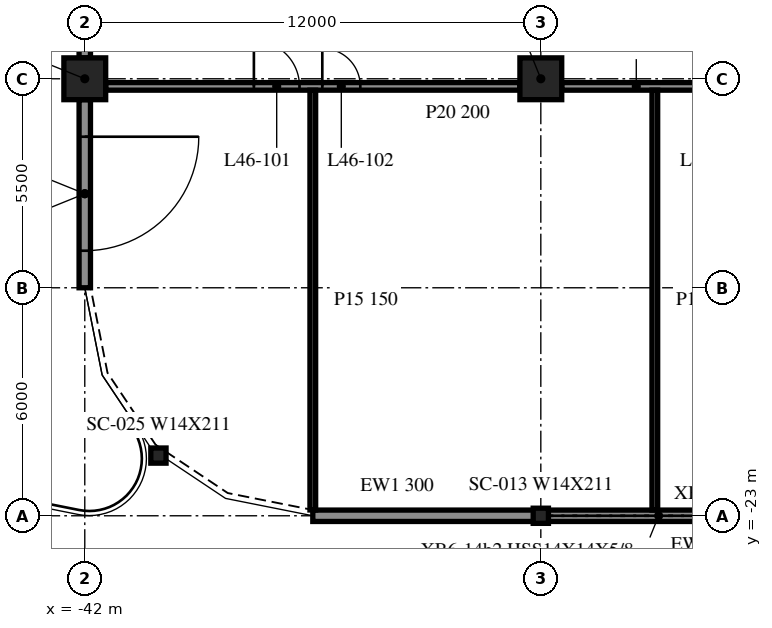
"""IFC4 building model, lengths in metres.
Left out: names, types, materials, properties, quantities, classifications, styles, units other than length and angle.
Written with IfcOpenShell. Run it as: python <this file> out.ifc"""

import sys

from ifc_helpers import new_model, si_unit, direction, frame, frame_2d, origin, origin_2d, place, context, subcontext, project, spatial, rectangle, i_section, extrude, element, fill, save


model = new_model("IFC4")
c1 = context("Model", 3, precision=1e-05, world=origin(), true_north=direction((0.0, 1.0)))
c2 = subcontext(c1, "Body", "Model", "MODEL_VIEW")
j1 = project(units=[si_unit("LENGTHUNIT", "METRE"), si_unit("PLANEANGLEUNIT", "RADIAN")], contexts=[c1])
p1 = place(None, origin())
s1 = spatial("IfcSite", under=j1, at=p1, CompositionType="ELEMENT")
p2 = place(p1, origin())
s2 = spatial("IfcBuilding", under=s1, at=p2, CompositionType="ELEMENT")
p3 = place(p2, frame((0.0, 0.0, 193.9)))
s3 = spatial("IfcBuildingStorey", under=s2, at=p3, CompositionType="ELEMENT", Elevation=193.9)
for number, where, z_axis, x_axis in (
    (1, (-42.0, -11.5, -0.34), (0.0, 0.0, 1.0), (1.0, 0.0, 0.0)),
    (2, (-30.0, -11.5, -0.34), (0.0, 0.0, 1.0), (1.0, 0.0, 0.0)),
):
    element("IfcColumn", number, at=place(p3, frame(where, z_axis=z_axis, x_axis=x_axis)), inside=s3, PredefinedType="COLUMN", context=c2, shape_type="SweptSolid", body=[
        extrude(rectangle(XDim=1.1, YDim=1.1, at=origin_2d()), origin(), (0.0, 0.0, 1.0), 3.8),
    ])
for number, where, z_axis, x_axis in (
    (3, (-40.062, -21.416, -0.34), (0.0, 0.0, 1.0), (1.0, 0.0, 0.0)),
    (4, (-30.0, -23.0, -0.34), (0.0, 0.0, 1.0), (1.0, 0.0, 0.0)),
):
    element("IfcColumn", number, at=place(p3, frame(where, z_axis=z_axis, x_axis=x_axis)), inside=s3, PredefinedType="COLUMN", context=c2, shape_type="SweptSolid", body=[
        extrude(i_section(OverallWidth=0.401, OverallDepth=0.399, WebThickness=0.025, FlangeThickness=0.04, at=origin_2d()), origin(), (0.0, 0.0, 1.0), 3.8),
    ])
p4 = place(p3, frame((-42.0, -0.55, 0.0), z_axis=(0.0, 0.0, 1.0), x_axis=(0.0, -1.0, 0.0)))
e5 = element("IfcWall", 5, at=p4, inside=s3, PredefinedType="NOTDEFINED", context=c2, shape_type="SweptSolid", body=[
    extrude(rectangle(XDim=10.4, YDim=0.3, at=frame_2d((5.2, 0.0))), origin(), (0.0, 0.0, 1.0), 2.782),
])
p5 = place(p4, frame((3.7, 0.0, 0.0)))
e6 = element("IfcOpeningElement", 6, at=p5, cuts=e5, PredefinedType="OPENING", context=c2, shape_type="SweptSolid", body=[
    extrude(rectangle(XDim=3.0, YDim=2.4, at=frame_2d((1.5, 1.2))), frame((0.0, 0.16, 0.0), z_axis=(0.0, -1.0, 0.0), x_axis=(1.0, 0.0, 0.0)), (0.0, 0.0, 1.0), 0.32),
])
p6 = place(p3, frame((-42.0, -12.05, 0.0), z_axis=(0.0, 0.0, 1.0), x_axis=(0.0, -1.0, 0.0)))
e7 = element("IfcWall", 7, at=p6, inside=s3, PredefinedType="NOTDEFINED", context=c2, shape_type="SweptSolid", body=[
    extrude(rectangle(XDim=4.95, YDim=0.3, at=frame_2d((2.475, 0.0))), origin(), (0.0, 0.0, 1.0), 2.782),
])
p7 = place(p6, frame((0.975, 0.0, 0.0)))
e8 = element("IfcOpeningElement", 8, at=p7, cuts=e7, PredefinedType="OPENING", context=c2, shape_type="SweptSolid", body=[
    extrude(rectangle(XDim=3.0, YDim=2.4, at=frame_2d((1.5, 1.2))), frame((0.0, 0.16, 0.0), z_axis=(0.0, -1.0, 0.0), x_axis=(1.0, 0.0, 0.0)), (0.0, 0.0, 1.0), 0.32),
])
p8 = place(p3, frame((-36.0, -23.0, 0.0), z_axis=(0.0, 0.0, 1.0), x_axis=(1.0, 0.0, 0.0)))
e9 = element("IfcWall", 9, at=p8, inside=s3, PredefinedType="NOTDEFINED", context=c2, shape_type="SweptSolid", body=[
    extrude(rectangle(XDim=5.988, YDim=0.3, at=frame_2d((2.994, 0.0))), origin(), (0.0, 0.0, 1.0), 2.782),
])
p9 = place(p3, frame((-29.988, -23.0, 0.0), z_axis=(0.0, 0.0, 1.0), x_axis=(1.0, 0.0, 0.0)))
e10 = element("IfcWall", 10, at=p9, inside=s3, PredefinedType="NOTDEFINED", context=c2, shape_type="SweptSolid", body=[
    extrude(rectangle(XDim=11.975, YDim=0.3, at=frame_2d((5.988, 0.0))), origin(), (0.0, 0.0, 1.0), 2.782),
])
p10 = place(p3, frame((-41.45, -11.7, 0.0), z_axis=(0.0, 0.0, 1.0), x_axis=(1.0, 0.0, 0.0)))
e11 = element("IfcWall", 11, at=p10, inside=s3, PredefinedType="PARTITIONING", context=c2, shape_type="SweptSolid", body=[
    extrude(rectangle(XDim=10.9, YDim=0.2, at=frame_2d((5.45, 0.0))), origin(), (0.0, 0.0, 1.0), 3.46),
])
p11 = place(p10, frame((3.9, 0.0, 0.0)))
e12 = element("IfcOpeningElement", 12, at=p11, cuts=e11, PredefinedType="OPENING", context=c2, shape_type="SweptSolid", body=[
    extrude(rectangle(XDim=1.2, YDim=2.1, at=frame_2d((0.6, 1.05))), frame((0.0, 0.11, 0.0), z_axis=(0.0, -1.0, 0.0), x_axis=(1.0, 0.0, 0.0)), (0.0, 0.0, 1.0), 0.22),
])
p12 = place(p10, frame((5.7, 0.0, 0.0)))
e13 = element("IfcOpeningElement", 13, at=p12, cuts=e11, PredefinedType="OPENING", context=c2, shape_type="SweptSolid", body=[
    extrude(rectangle(XDim=1.0, YDim=2.1, at=frame_2d((0.5, 1.05))), frame((0.0, 0.11, 0.0), z_axis=(0.0, -1.0, 0.0), x_axis=(1.0, 0.0, 0.0)), (0.0, 0.0, 1.0), 0.22),
])
p13 = place(p3, frame((-29.45, -11.7, 0.0), z_axis=(0.0, 0.0, 1.0), x_axis=(1.0, 0.0, 0.0)))
e14 = element("IfcWall", 14, at=p13, inside=s3, PredefinedType="PARTITIONING", context=c2, shape_type="SweptSolid", body=[
    extrude(rectangle(XDim=10.9, YDim=0.2, at=frame_2d((5.45, 0.0))), origin(), (0.0, 0.0, 1.0), 3.46),
])
p14 = place(p13, frame((3.9, 0.0, 0.0)))
e15 = element("IfcOpeningElement", 15, at=p14, cuts=e14, PredefinedType="OPENING", context=c2, shape_type="SweptSolid", body=[
    extrude(rectangle(XDim=1.2, YDim=2.1, at=frame_2d((0.6, 1.05))), frame((0.0, 0.11, 0.0), z_axis=(0.0, -1.0, 0.0), x_axis=(1.0, 0.0, 0.0)), (0.0, 0.0, 1.0), 0.22),
])
p15 = place(p13, frame((5.7, 0.0, 0.0)))
e16 = element("IfcOpeningElement", 16, at=p15, cuts=e14, PredefinedType="OPENING", context=c2, shape_type="SweptSolid", body=[
    extrude(rectangle(XDim=1.2, YDim=2.1, at=frame_2d((0.6, 1.05))), frame((0.0, 0.11, 0.0), z_axis=(0.0, -1.0, 0.0), x_axis=(1.0, 0.0, 0.0)), (0.0, 0.0, 1.0), 0.22),
])
p16 = place(p3, frame((-36.0, -22.847, 0.0), z_axis=(0.0, 0.0, 1.0), x_axis=(0.0, 1.0, 0.0)))
e17 = element("IfcWall", 17, at=p16, inside=s3, PredefinedType="PARTITIONING", context=c2, shape_type="SweptSolid", body=[
    extrude(rectangle(XDim=11.047, YDim=0.15, at=frame_2d((5.523, 0.0))), origin(), (0.0, 0.0, 1.0), 3.46),
])
p17 = place(p3, frame((-27.0, -22.85, 0.0), z_axis=(0.0, 0.0, 1.0), x_axis=(0.0, 1.0, 0.0)))
e18 = element("IfcWall", 18, at=p17, inside=s3, PredefinedType="PARTITIONING", context=c2, shape_type="SweptSolid", body=[
    extrude(rectangle(XDim=11.05, YDim=0.15, at=frame_2d((5.525, 0.0))), origin(), (0.0, 0.0, 1.0), 3.46),
])
p18 = place(p7, origin())
e19 = element("IfcDoor", 19, at=p18, inside=s3, OperationType="SINGLE_SWING_LEFT", PredefinedType="DOOR", context=c2, shape_type="SweptSolid", body=[
    extrude(rectangle(XDim=3.0, YDim=2.4, at=frame_2d((1.5, 1.2))), frame((0.0, 0.025, 0.0), z_axis=(0.0, -1.0, 0.0), x_axis=(1.0, 0.0, 0.0)), (0.0, 0.0, 1.0), 0.05),
])
fill(e8, e19)
p19 = place(p11, origin())
e20 = element("IfcDoor", 20, at=p19, inside=s3, OperationType="SINGLE_SWING_RIGHT", PredefinedType="DOOR", context=c2, shape_type="SweptSolid", body=[
    extrude(rectangle(XDim=1.2, YDim=2.1, at=frame_2d((0.6, 1.05))), frame((0.0, 0.025, 0.0), z_axis=(0.0, -1.0, 0.0), x_axis=(1.0, 0.0, 0.0)), (0.0, 0.0, 1.0), 0.05),
])
fill(e12, e20)
p20 = place(p12, origin())
e21 = element("IfcDoor", 21, at=p20, inside=s3, OperationType="SINGLE_SWING_LEFT", PredefinedType="DOOR", context=c2, shape_type="SweptSolid", body=[
    extrude(rectangle(XDim=1.0, YDim=2.1, at=frame_2d((0.5, 1.05))), frame((0.0, 0.025, 0.0), z_axis=(0.0, -1.0, 0.0), x_axis=(1.0, 0.0, 0.0)), (0.0, 0.0, 1.0), 0.05),
])
fill(e13, e21)
save(model, sys.argv[1])
